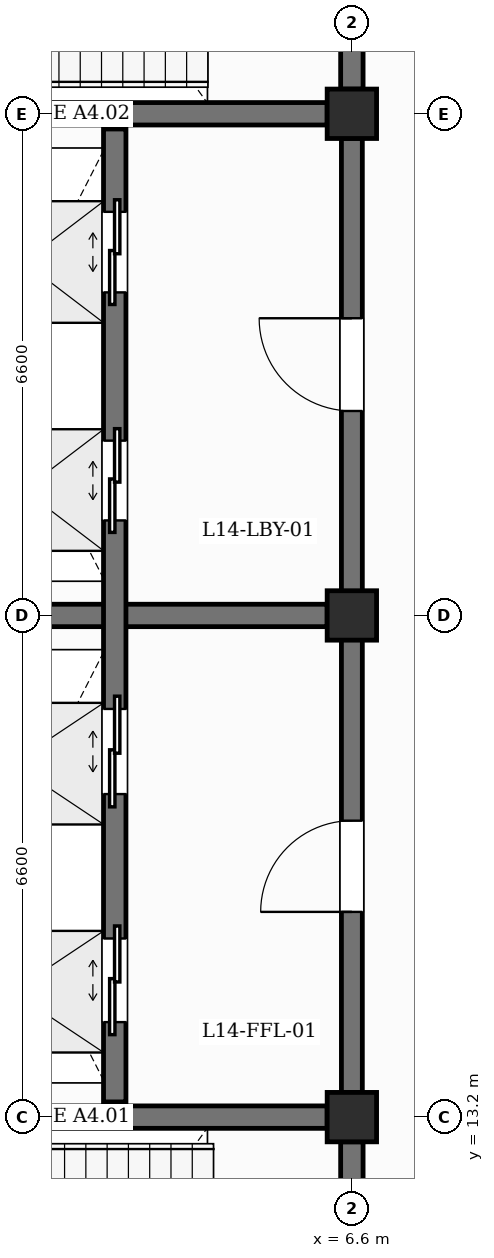
"""IFC4 building model, lengths in metres.
Left out: names, types, materials, properties, quantities, classifications, styles, units other than length and angle.
Written with IfcOpenShell. Run it as: python <this file> out.ifc"""

import sys

from ifc_helpers import new_model, si_unit, direction, frame, frame_2d, origin, origin_2d, place, context, subcontext, project, spatial, rectangle, extrude, element, fill, save


model = new_model("IFC4")
c1 = context("Model", 3, precision=1e-05, world=origin(), true_north=direction((0.0, 1.0)))
c2 = subcontext(c1, "Body", "Model", "MODEL_VIEW")
j1 = project(units=[si_unit("LENGTHUNIT", "METRE"), si_unit("PLANEANGLEUNIT", "RADIAN")], contexts=[c1])
p1 = place(None, origin())
s1 = spatial("IfcSite", under=j1, at=p1, CompositionType="ELEMENT")
p2 = place(p1, origin())
s2 = spatial("IfcBuilding", under=s1, at=p2, CompositionType="ELEMENT")
p3 = place(p2, frame((0.0, 0.0, 60.6)))
s3 = spatial("IfcBuildingStorey", under=s2, at=p3, CompositionType="ELEMENT", Elevation=60.6)
for number, where, z_axis, x_axis in (
    (1, (6.6, 13.2, 0.0), (0.0, 0.0, 1.0), (1.0, 0.0, 0.0)),
    (2, (6.6, 19.8, 0.0), (0.0, 0.0, 1.0), (1.0, 0.0, 0.0)),
    (3, (6.6, 26.4, 0.0), (0.0, 0.0, 1.0), (1.0, 0.0, 0.0)),
):
    element("IfcColumn", number, at=place(p3, frame(where, z_axis=z_axis, x_axis=x_axis)), inside=s3, PredefinedType="COLUMN", context=c2, shape_type="SweptSolid", body=[
        extrude(rectangle(XDim=0.65, YDim=0.65, at=origin_2d()), origin(), (0.0, 0.0, 1.0), 4.2),
    ])
p4 = place(p3, frame((0.325, 13.2, 0.0), z_axis=(0.0, 0.0, 1.0), x_axis=(1.0, 0.0, 0.0)))
e4 = element("IfcWall", 4, at=p4, inside=s3, PredefinedType="SHEAR", context=c2, shape_type="SweptSolid", body=[
    extrude(rectangle(XDim=5.95, YDim=0.295, at=frame_2d((2.975, 0.0))), origin(), (0.0, 0.0, 1.0), 3.31),
])
p5 = place(p3, frame((6.6, 6.925, 0.0), z_axis=(0.0, 0.0, 1.0), x_axis=(0.0, 1.0, 0.0)))
e5 = element("IfcWall", 5, at=p5, inside=s3, PredefinedType="SHEAR", context=c2, shape_type="SweptSolid", body=[
    extrude(rectangle(XDim=5.95, YDim=0.295, at=frame_2d((2.975, 0.0))), origin(), (0.0, 0.0, 1.0), 3.31),
])
p6 = place(p5, frame((2.4, 0.0, 0.0)))
e6 = element("IfcOpeningElement", 6, at=p6, cuts=e5, PredefinedType="OPENING", context=c2, shape_type="SweptSolid", body=[
    extrude(rectangle(XDim=1.15, YDim=2.2, at=frame_2d((0.575, 1.1))), frame((0.0, 0.157, 0.0), z_axis=(0.0, -1.0, 0.0), x_axis=(1.0, 0.0, 0.0)), (0.0, 0.0, 1.0), 0.315),
])
p7 = place(p3, frame((0.325, 26.4, 0.0), z_axis=(0.0, 0.0, 1.0), x_axis=(1.0, 0.0, 0.0)))
e7 = element("IfcWall", 7, at=p7, inside=s3, PredefinedType="SHEAR", context=c2, shape_type="SweptSolid", body=[
    extrude(rectangle(XDim=5.95, YDim=0.295, at=frame_2d((2.975, 0.0))), origin(), (0.0, 0.0, 1.0), 3.31),
])
p8 = place(p3, frame((6.6, 26.725, 0.0), z_axis=(0.0, 0.0, 1.0), x_axis=(0.0, 1.0, 0.0)))
e8 = element("IfcWall", 8, at=p8, inside=s3, PredefinedType="SHEAR", context=c2, shape_type="SweptSolid", body=[
    extrude(rectangle(XDim=5.95, YDim=0.295, at=frame_2d((2.975, 0.0))), origin(), (0.0, 0.0, 1.0), 3.31),
])
p9 = place(p8, frame((2.4, 0.0, 0.0)))
e9 = element("IfcOpeningElement", 9, at=p9, cuts=e8, PredefinedType="OPENING", context=c2, shape_type="SweptSolid", body=[
    extrude(rectangle(XDim=1.15, YDim=2.2, at=frame_2d((0.575, 1.1))), frame((0.0, 0.157, 0.0), z_axis=(0.0, -1.0, 0.0), x_axis=(1.0, 0.0, 0.0)), (0.0, 0.0, 1.0), 0.315),
])
p10 = place(p3, frame((0.325, 19.8, 0.0), z_axis=(0.0, 0.0, 1.0), x_axis=(1.0, 0.0, 0.0)))
e10 = element("IfcWall", 10, at=p10, inside=s3, PredefinedType="SHEAR", context=c2, shape_type="SweptSolid", body=[
    extrude(rectangle(XDim=5.95, YDim=0.295, at=frame_2d((2.975, 0.0))), origin(), (0.0, 0.0, 1.0), 3.31),
])
p11 = place(p3, frame((6.6, 13.525, 0.0), z_axis=(0.0, 0.0, 1.0), x_axis=(0.0, 1.0, 0.0)))
e11 = element("IfcWall", 11, at=p11, inside=s3, PredefinedType="SHEAR", context=c2, shape_type="SweptSolid", body=[
    extrude(rectangle(XDim=5.95, YDim=0.275, at=frame_2d((2.975, 0.0))), origin(), (0.0, 0.0, 1.0), 3.31),
])
p12 = place(p11, frame((2.375, 0.0, 0.0)))
e12 = element("IfcOpeningElement", 12, at=p12, cuts=e11, PredefinedType="OPENING", context=c2, shape_type="SweptSolid", body=[
    extrude(rectangle(XDim=1.2, YDim=2.25, at=frame_2d((0.6, 1.125))), frame((0.0, 0.147, 0.0), z_axis=(0.0, -1.0, 0.0), x_axis=(1.0, 0.0, 0.0)), (0.0, 0.0, 1.0), 0.295),
])
p13 = place(p3, frame((6.6, 20.125, 0.0), z_axis=(0.0, 0.0, 1.0), x_axis=(0.0, 1.0, 0.0)))
e13 = element("IfcWall", 13, at=p13, inside=s3, PredefinedType="SHEAR", context=c2, shape_type="SweptSolid", body=[
    extrude(rectangle(XDim=5.95, YDim=0.275, at=frame_2d((2.975, 0.0))), origin(), (0.0, 0.0, 1.0), 3.31),
])
p14 = place(p13, frame((2.365, 0.0, 0.0)))
e14 = element("IfcOpeningElement", 14, at=p14, cuts=e13, PredefinedType="OPENING", context=c2, shape_type="SweptSolid", body=[
    extrude(rectangle(XDim=1.22, YDim=2.15, at=frame_2d((0.61, 1.075))), frame((0.0, 0.147, 0.0), z_axis=(0.0, -1.0, 0.0), x_axis=(1.0, 0.0, 0.0)), (0.0, 0.0, 1.0), 0.295),
])
p15 = place(p3, frame((3.48, 13.4, 0.0), z_axis=(0.0, 0.0, 1.0), x_axis=(0.0, 1.0, 0.0)))
e15 = element("IfcWall", 15, at=p15, inside=s3, PredefinedType="SHEAR", context=c2, shape_type="SweptSolid", body=[
    extrude(rectangle(XDim=6.2, YDim=0.295, at=frame_2d((3.1, 0.0))), origin(), (0.0, 0.0, 1.0), 3.91),
])
p16 = place(p15, frame((1.05, 0.0, 0.0)))
e16 = element("IfcOpeningElement", 16, at=p16, cuts=e15, PredefinedType="OPENING", context=c2, shape_type="SweptSolid", body=[
    extrude(rectangle(XDim=1.1, YDim=2.15, at=frame_2d((0.55, 1.075))), frame((0.0, 0.157, 0.0), z_axis=(0.0, -1.0, 0.0), x_axis=(1.0, 0.0, 0.0)), (0.0, 0.0, 1.0), 0.315),
])
p17 = place(p15, frame((4.05, 0.0, 0.0)))
e17 = element("IfcOpeningElement", 17, at=p17, cuts=e15, PredefinedType="OPENING", context=c2, shape_type="SweptSolid", body=[
    extrude(rectangle(XDim=1.12, YDim=2.15, at=frame_2d((0.56, 1.075))), frame((0.0, 0.157, 0.0), z_axis=(0.0, -1.0, 0.0), x_axis=(1.0, 0.0, 0.0)), (0.0, 0.0, 1.0), 0.315),
])
p18 = place(p3, frame((3.48, 20.0, 0.0), z_axis=(0.0, 0.0, 1.0), x_axis=(0.0, 1.0, 0.0)))
e18 = element("IfcWall", 18, at=p18, inside=s3, PredefinedType="SHEAR", context=c2, shape_type="SweptSolid", body=[
    extrude(rectangle(XDim=6.2, YDim=0.295, at=frame_2d((3.1, 0.0))), origin(), (0.0, 0.0, 1.0), 3.91),
])
p19 = place(p18, frame((1.05, 0.0, 0.0)))
e19 = element("IfcOpeningElement", 19, at=p19, cuts=e18, PredefinedType="OPENING", context=c2, shape_type="SweptSolid", body=[
    extrude(rectangle(XDim=1.05, YDim=2.15, at=frame_2d((0.525, 1.075))), frame((0.0, 0.157, 0.0), z_axis=(0.0, -1.0, 0.0), x_axis=(1.0, 0.0, 0.0)), (0.0, 0.0, 1.0), 0.315),
])
p20 = place(p18, frame((4.05, 0.0, 0.0)))
e20 = element("IfcOpeningElement", 20, at=p20, cuts=e18, PredefinedType="OPENING", context=c2, shape_type="SweptSolid", body=[
    extrude(rectangle(XDim=1.06, YDim=2.15, at=frame_2d((0.53, 1.075))), frame((0.0, 0.157, 0.0), z_axis=(0.0, -1.0, 0.0), x_axis=(1.0, 0.0, 0.0)), (0.0, 0.0, 1.0), 0.315),
])
p21 = place(p16, origin())
e21 = element("IfcDoor", 21, at=p21, inside=s3, OperationType="DOUBLE_DOOR_SLIDING", PredefinedType="USERDEFINED", context=c2, shape_type="SweptSolid", body=[
    extrude(rectangle(XDim=1.1, YDim=2.15, at=frame_2d((0.55, 1.075))), frame((0.0, 0.025, 0.0), z_axis=(0.0, -1.0, 0.0), x_axis=(1.0, 0.0, 0.0)), (0.0, 0.0, 1.0), 0.05),
])
fill(e16, e21)
p22 = place(p17, origin())
e22 = element("IfcDoor", 22, at=p22, inside=s3, OperationType="DOUBLE_DOOR_SLIDING", PredefinedType="USERDEFINED", context=c2, shape_type="SweptSolid", body=[
    extrude(rectangle(XDim=1.12, YDim=2.15, at=frame_2d((0.56, 1.075))), frame((0.0, 0.025, 0.0), z_axis=(0.0, -1.0, 0.0), x_axis=(1.0, 0.0, 0.0)), (0.0, 0.0, 1.0), 0.05),
])
fill(e17, e22)
p23 = place(p19, origin())
e23 = element("IfcDoor", 23, at=p23, inside=s3, OperationType="DOUBLE_DOOR_SLIDING", PredefinedType="USERDEFINED", context=c2, shape_type="SweptSolid", body=[
    extrude(rectangle(XDim=1.05, YDim=2.15, at=frame_2d((0.525, 1.075))), frame((0.0, 0.025, 0.0), z_axis=(0.0, -1.0, 0.0), x_axis=(1.0, 0.0, 0.0)), (0.0, 0.0, 1.0), 0.05),
])
fill(e19, e23)
p24 = place(p20, origin())
e24 = element("IfcDoor", 24, at=p24, inside=s3, OperationType="DOUBLE_DOOR_SLIDING", PredefinedType="USERDEFINED", context=c2, shape_type="SweptSolid", body=[
    extrude(rectangle(XDim=1.06, YDim=2.15, at=frame_2d((0.53, 1.075))), frame((0.0, 0.025, 0.0), z_axis=(0.0, -1.0, 0.0), x_axis=(1.0, 0.0, 0.0)), (0.0, 0.0, 1.0), 0.05),
])
fill(e20, e24)
p25 = place(p12, origin())
e25 = element("IfcDoor", 25, at=p25, inside=s3, OperationType="SINGLE_SWING_LEFT", PredefinedType="DOOR", context=c2, shape_type="SweptSolid", body=[
    extrude(rectangle(XDim=1.2, YDim=2.25, at=frame_2d((0.6, 1.125))), frame((0.0, 0.025, 0.0), z_axis=(0.0, -1.0, 0.0), x_axis=(1.0, 0.0, 0.0)), (0.0, 0.0, 1.0), 0.05),
])
fill(e12, e25)
p26 = place(p14, origin())
e26 = element("IfcDoor", 26, at=p26, inside=s3, OperationType="SINGLE_SWING_RIGHT", PredefinedType="DOOR", context=c2, shape_type="SweptSolid", body=[
    extrude(rectangle(XDim=1.22, YDim=2.15, at=frame_2d((0.61, 1.075))), frame((0.0, 0.025, 0.0), z_axis=(0.0, -1.0, 0.0), x_axis=(1.0, 0.0, 0.0)), (0.0, 0.0, 1.0), 0.05),
])
fill(e14, e26)
save(model, sys.argv[1])
